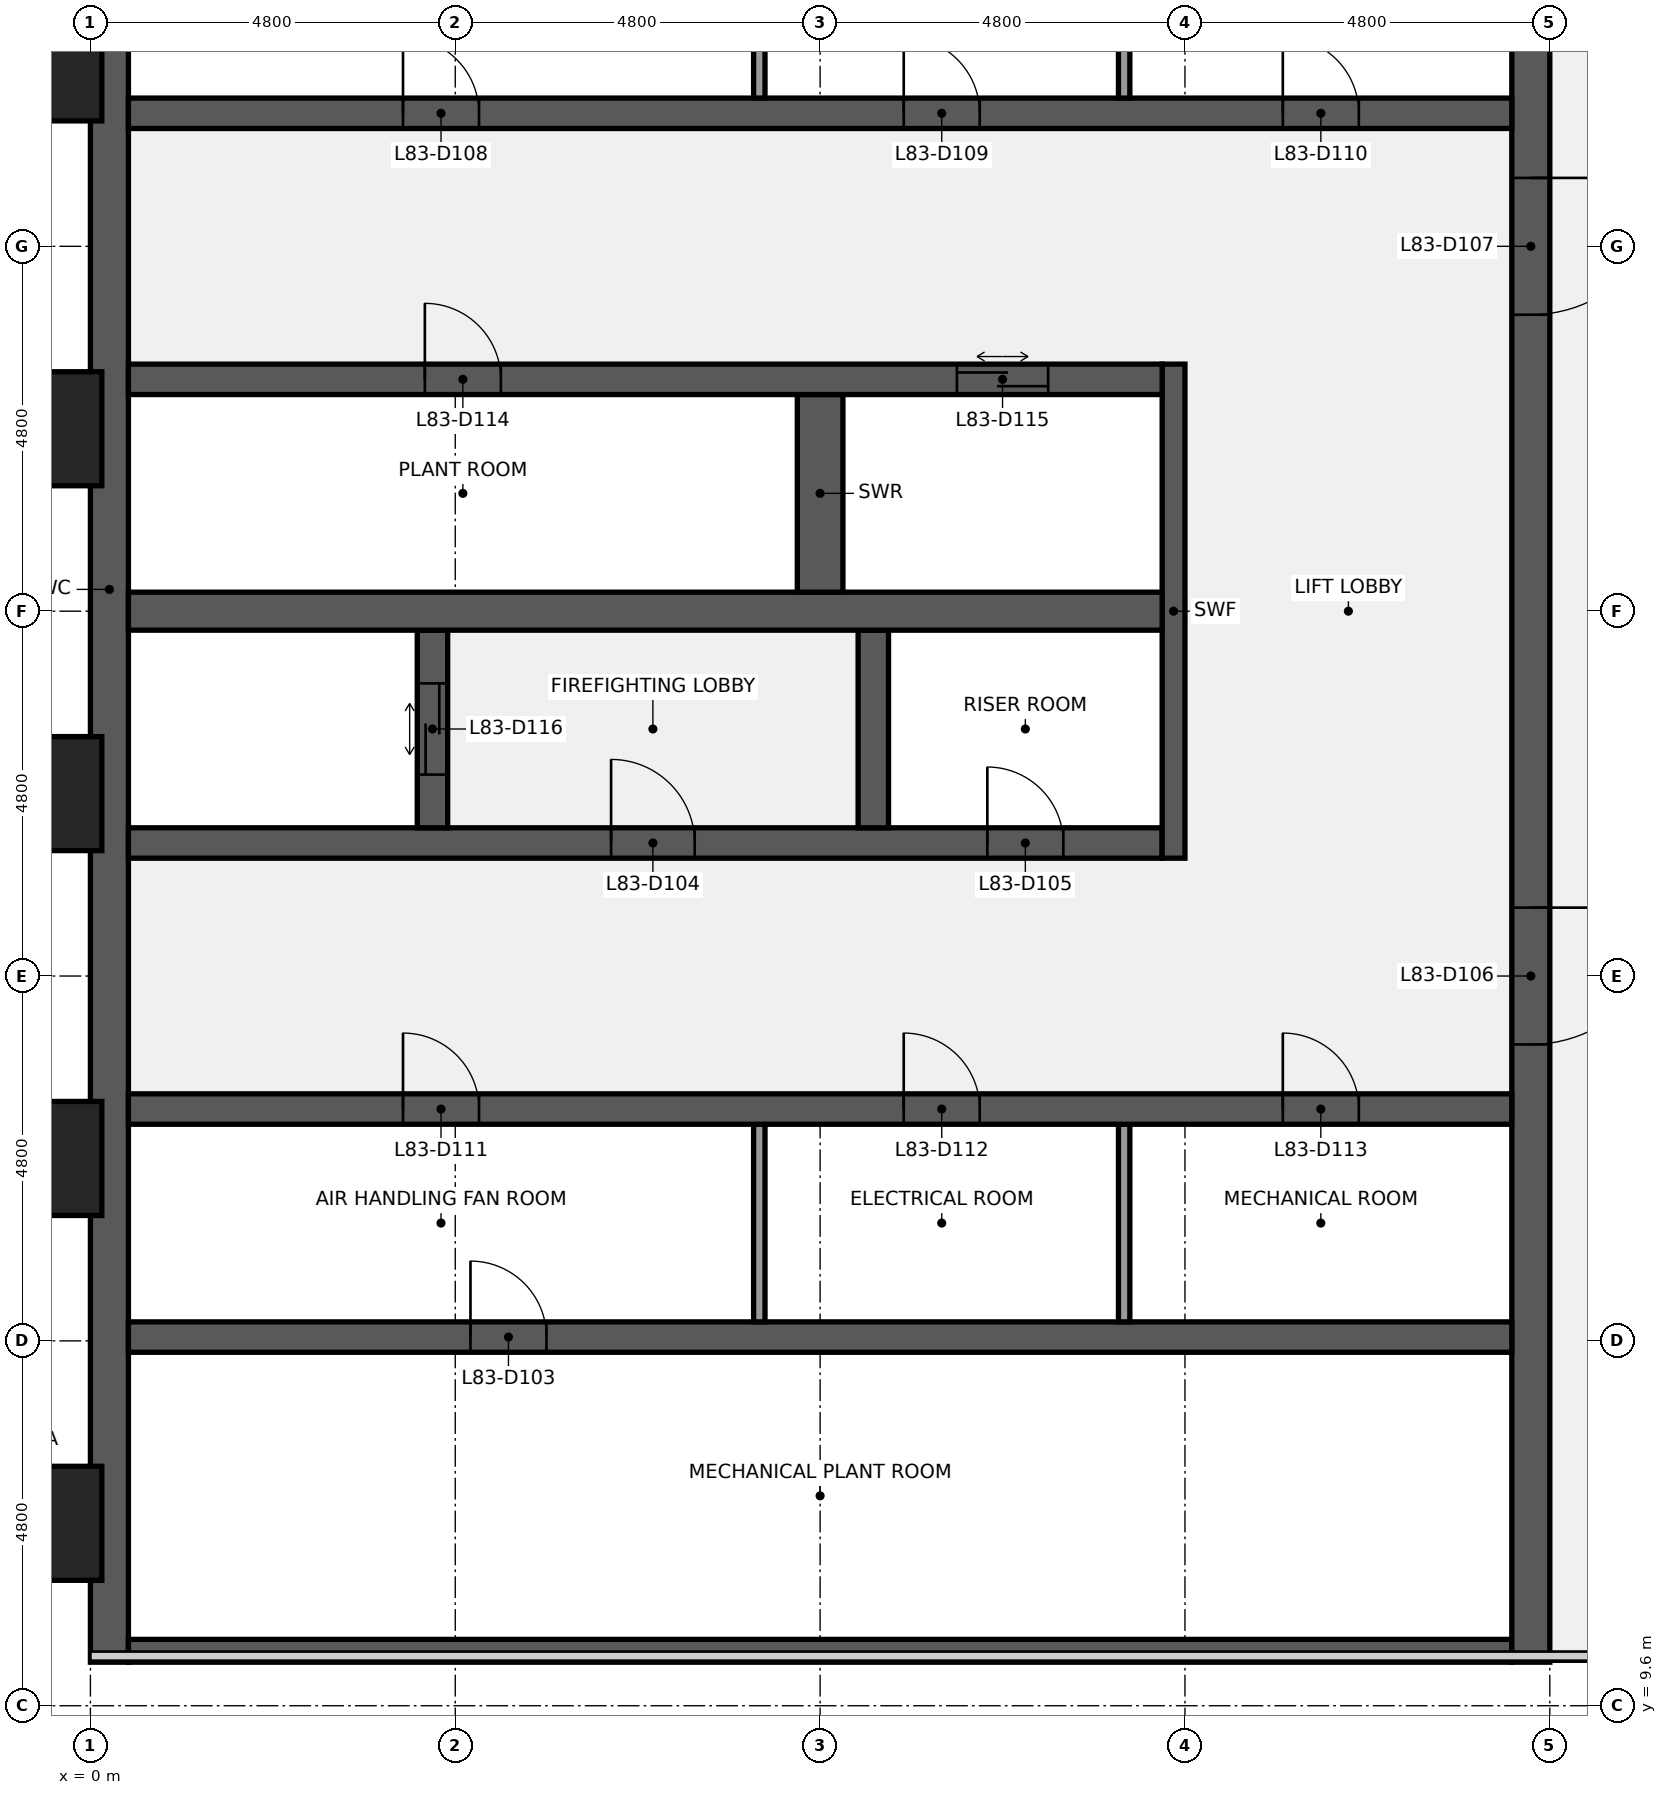
"""IFC4 building model, lengths in metres.
Left out: names, types, materials, properties, quantities, classifications, styles, units other than length and angle.
Written with IfcOpenShell. Run it as: python <this file> out.ifc"""

import sys

from ifc_helpers import new_model, si_unit, direction, frame, frame_2d, origin, origin_2d, place, context, subcontext, project, spatial, polyline, rectangle, outline, extrude, element, fill, save


model = new_model("IFC4")
c1 = context("Model", 3, precision=1e-05, world=origin(), true_north=direction((0.0, 1.0)))
c2 = subcontext(c1, "Body", "Model", "MODEL_VIEW")
j1 = project(units=[si_unit("LENGTHUNIT", "METRE"), si_unit("PLANEANGLEUNIT", "RADIAN")], contexts=[c1])
p1 = place(None, origin())
s1 = spatial("IfcSite", under=j1, at=p1, CompositionType="ELEMENT")
p2 = place(p1, origin())
s2 = spatial("IfcBuilding", under=s1, at=p2, CompositionType="ELEMENT")
p3 = place(p2, frame((0.0, 0.0, 370.3)))
s3 = spatial("IfcBuildingStorey", under=s2, at=p3, CompositionType="ELEMENT", Elevation=370.3)
p4 = place(p3, frame((0.25, 10.173, 0.0), z_axis=(0.0, 0.0, 1.0), x_axis=(0.0, 1.0, 0.0)))
e1 = element("IfcWall", 1, at=p4, inside=s3, PredefinedType="SHEAR", context=c2, shape_type="SweptSolid", body=[
    extrude(outline(polyline([(0.0, 0.0), (28.227, 0.0), (28.227, 3.75), (1.247, 3.75), (0.0, 2.488), (0.0, 0.0)])), frame((0.0, 0.25, 0.0), z_axis=(0.0, -1.0, 0.0), x_axis=(1.0, 0.0, 0.0)), (0.0, 0.0, 1.0), 0.5),
])
p5 = place(p3, frame((18.7, 10.323, 0.0), z_axis=(0.0, 0.0, 1.0), x_axis=(-1.0, 0.0, 0.0)))
e2 = element("IfcWall", 2, at=p5, inside=s3, PredefinedType="SHEAR", context=c2, shape_type="SweptSolid", body=[
    extrude(outline(polyline([(0.0, 0.0), (18.2, 0.0), (18.2, 2.639), (0.0, 2.639), (0.0, 0.0)])), frame((0.0, 0.15, 0.0), z_axis=(0.0, -1.0, 0.0), x_axis=(1.0, 0.0, 0.0)), (0.0, 0.0, 1.0), 0.3),
])
p6 = place(p3, frame((18.95, 38.4, 0.0), z_axis=(0.0, 0.0, 1.0), x_axis=(0.0, -1.0, 0.0)))
e3 = element("IfcWall", 3, at=p6, inside=s3, PredefinedType="SHEAR", context=c2, shape_type="SweptSolid", body=[
    extrude(outline(polyline([(0.0, 0.0), (28.227, 0.0), (28.227, 2.488), (26.98, 3.75), (0.0, 3.75), (0.0, 0.0)])), frame((0.0, 0.25, 0.0), z_axis=(0.0, -1.0, 0.0), x_axis=(1.0, 0.0, 0.0)), (0.0, 0.0, 1.0), 0.5),
])
p7 = place(p6, frame((18.3, 0.0, 0.0)))
e4 = element("IfcOpeningElement", 4, at=p7, cuts=e3, PredefinedType="OPENING", context=c2, shape_type="SweptSolid", body=[
    extrude(rectangle(XDim=1.8, YDim=2.1, at=frame_2d((0.9, 1.05))), frame((0.0, 0.26, 0.0), z_axis=(0.0, -1.0, 0.0), x_axis=(1.0, 0.0, 0.0)), (0.0, 0.0, 1.0), 0.52),
])
p8 = place(p6, frame((8.7, 0.0, 0.0)))
e5 = element("IfcOpeningElement", 5, at=p8, cuts=e3, PredefinedType="OPENING", context=c2, shape_type="SweptSolid", body=[
    extrude(rectangle(XDim=1.8, YDim=2.1, at=frame_2d((0.9, 1.05))), frame((0.0, 0.26, 0.0), z_axis=(0.0, -1.0, 0.0), x_axis=(1.0, 0.0, 0.0)), (0.0, 0.0, 1.0), 0.52),
])
p9 = place(p3, frame((0.5, 14.45, 0.0), z_axis=(0.0, 0.0, 1.0), x_axis=(1.0, 0.0, 0.0)))
e6 = element("IfcWall", 6, at=p9, inside=s3, PredefinedType="SHEAR", context=c2, shape_type="SweptSolid", body=[
    extrude(rectangle(XDim=18.2, YDim=0.4, at=frame_2d((9.1, 0.0))), origin(), (0.0, 0.0, 1.0), 3.75),
])
p10 = place(p9, frame((4.5, 0.0, 0.0)))
e7 = element("IfcOpeningElement", 7, at=p10, cuts=e6, PredefinedType="OPENING", context=c2, shape_type="SweptSolid", body=[
    extrude(rectangle(XDim=1.0, YDim=2.1, at=frame_2d((0.5, 1.05))), frame((0.0, 0.21, 0.0), z_axis=(0.0, -1.0, 0.0), x_axis=(1.0, 0.0, 0.0)), (0.0, 0.0, 1.0), 0.42),
])
for number, where, z_axis, x_axis in (
    (8, (8.8, 14.65, 0.0), (0.0, 0.0, 1.0), (0.0, 1.0, 0.0)),
    (9, (13.6, 14.65, 0.0), (0.0, 0.0, 1.0), (0.0, 1.0, 0.0)),
):
    element("IfcWall", number, at=place(p3, frame(where, z_axis=z_axis, x_axis=x_axis)), inside=s3, PredefinedType="PARTITIONING", context=c2, shape_type="SweptSolid", body=[
        extrude(rectangle(XDim=2.6, YDim=0.15, at=frame_2d((1.3, 0.0))), origin(), (0.0, 0.0, 1.0), 3.75),
    ])
p11 = place(p3, frame((0.5, 17.45, 0.0), z_axis=(0.0, 0.0, 1.0), x_axis=(1.0, 0.0, 0.0)))
e10 = element("IfcWall", 10, at=p11, inside=s3, PredefinedType="SHEAR", context=c2, shape_type="SweptSolid", body=[
    extrude(rectangle(XDim=18.2, YDim=0.4, at=frame_2d((9.1, 0.0))), origin(), (0.0, 0.0, 1.0), 3.75),
])
p12 = place(p11, frame((3.613, 0.0, 0.0)))
e11 = element("IfcOpeningElement", 11, at=p12, cuts=e10, PredefinedType="OPENING", context=c2, shape_type="SweptSolid", body=[
    extrude(rectangle(XDim=1.0, YDim=2.1, at=frame_2d((0.5, 1.05))), frame((0.0, 0.21, 0.0), z_axis=(0.0, -1.0, 0.0), x_axis=(1.0, 0.0, 0.0)), (0.0, 0.0, 1.0), 0.42),
])
p13 = place(p11, frame((10.2, 0.0, 0.0)))
e12 = element("IfcOpeningElement", 12, at=p13, cuts=e10, PredefinedType="OPENING", context=c2, shape_type="SweptSolid", body=[
    extrude(rectangle(XDim=1.0, YDim=2.1, at=frame_2d((0.5, 1.05))), frame((0.0, 0.21, 0.0), z_axis=(0.0, -1.0, 0.0), x_axis=(1.0, 0.0, 0.0)), (0.0, 0.0, 1.0), 0.42),
])
p14 = place(p11, frame((15.188, 0.0, 0.0)))
e13 = element("IfcOpeningElement", 13, at=p14, cuts=e10, PredefinedType="OPENING", context=c2, shape_type="SweptSolid", body=[
    extrude(rectangle(XDim=1.0, YDim=2.1, at=frame_2d((0.5, 1.05))), frame((0.0, 0.21, 0.0), z_axis=(0.0, -1.0, 0.0), x_axis=(1.0, 0.0, 0.0)), (0.0, 0.0, 1.0), 0.42),
])
p15 = place(p3, frame((0.5, 20.95, 0.0), z_axis=(0.0, 0.0, 1.0), x_axis=(1.0, 0.0, 0.0)))
e14 = element("IfcWall", 14, at=p15, inside=s3, PredefinedType="SHEAR", context=c2, shape_type="SweptSolid", body=[
    extrude(rectangle(XDim=13.6, YDim=0.4, at=frame_2d((6.8, 0.0))), origin(), (0.0, 0.0, 1.0), 3.75),
])
p16 = place(p15, frame((6.35, 0.0, 0.0)))
e15 = element("IfcOpeningElement", 15, at=p16, cuts=e14, PredefinedType="OPENING", context=c2, shape_type="SweptSolid", body=[
    extrude(rectangle(XDim=1.1, YDim=2.1, at=frame_2d((0.55, 1.05))), frame((0.0, 0.21, 0.0), z_axis=(0.0, -1.0, 0.0), x_axis=(1.0, 0.0, 0.0)), (0.0, 0.0, 1.0), 0.42),
])
p17 = place(p15, frame((11.3, 0.0, 0.0)))
e16 = element("IfcOpeningElement", 16, at=p17, cuts=e14, PredefinedType="OPENING", context=c2, shape_type="SweptSolid", body=[
    extrude(rectangle(XDim=1.0, YDim=2.1, at=frame_2d((0.5, 1.05))), frame((0.0, 0.21, 0.0), z_axis=(0.0, -1.0, 0.0), x_axis=(1.0, 0.0, 0.0)), (0.0, 0.0, 1.0), 0.42),
])
p18 = place(p3, frame((14.25, 20.75, 0.0), z_axis=(0.0, 0.0, 1.0), x_axis=(0.0, 1.0, 0.0)))
e17 = element("IfcWall", 17, at=p18, inside=s3, PredefinedType="SHEAR", context=c2, shape_type="SweptSolid", body=[
    extrude(rectangle(XDim=6.5, YDim=0.3, at=frame_2d((3.25, 0.0))), origin(), (0.0, 0.0, 1.0), 3.75),
])
p19 = place(p3, frame((4.5, 21.15, 0.0), z_axis=(0.0, 0.0, 1.0), x_axis=(0.0, 1.0, 0.0)))
e18 = element("IfcWall", 18, at=p19, inside=s3, PredefinedType="SHEAR", context=c2, shape_type="SweptSolid", body=[
    extrude(rectangle(XDim=2.6, YDim=0.4, at=frame_2d((1.3, 0.0))), origin(), (0.0, 0.0, 1.0), 3.75),
])
p20 = place(p19, frame((0.7, 0.0, 0.0)))
e19 = element("IfcOpeningElement", 19, at=p20, cuts=e18, PredefinedType="OPENING", context=c2, shape_type="SweptSolid", body=[
    extrude(rectangle(XDim=1.2, YDim=2.1, at=frame_2d((0.6, 1.05))), frame((0.0, 0.21, 0.0), z_axis=(0.0, -1.0, 0.0), x_axis=(1.0, 0.0, 0.0)), (0.0, 0.0, 1.0), 0.42),
])
p21 = place(p3, frame((10.3, 21.15, 0.0), z_axis=(0.0, 0.0, 1.0), x_axis=(0.0, 1.0, 0.0)))
e20 = element("IfcWall", 20, at=p21, inside=s3, PredefinedType="SHEAR", context=c2, shape_type="SweptSolid", body=[
    extrude(rectangle(XDim=2.6, YDim=0.4, at=frame_2d((1.3, 0.0))), origin(), (0.0, 0.0, 1.0), 3.75),
])
p22 = place(p3, frame((0.5, 24.0, 0.0), z_axis=(0.0, 0.0, 1.0), x_axis=(1.0, 0.0, 0.0)))
e21 = element("IfcWall", 21, at=p22, inside=s3, PredefinedType="SHEAR", context=c2, shape_type="SweptSolid", body=[
    extrude(rectangle(XDim=13.6, YDim=0.5, at=frame_2d((6.8, 0.0))), origin(), (0.0, 0.0, 1.0), 3.75),
])
p23 = place(p3, frame((9.6, 24.25, 0.0), z_axis=(0.0, 0.0, 1.0), x_axis=(0.0, 1.0, 0.0)))
e22 = element("IfcWall", 22, at=p23, inside=s3, PredefinedType="SHEAR", context=c2, shape_type="SweptSolid", body=[
    extrude(rectangle(XDim=2.6, YDim=0.6, at=frame_2d((1.3, 0.0))), origin(), (0.0, 0.0, 1.0), 3.75),
])
p24 = place(p3, frame((0.5, 27.05, 0.0), z_axis=(0.0, 0.0, 1.0), x_axis=(1.0, 0.0, 0.0)))
e23 = element("IfcWall", 23, at=p24, inside=s3, PredefinedType="SHEAR", context=c2, shape_type="SweptSolid", body=[
    extrude(rectangle(XDim=13.6, YDim=0.4, at=frame_2d((6.8, 0.0))), origin(), (0.0, 0.0, 1.0), 3.75),
])
p25 = place(p24, frame((3.9, 0.0, 0.0)))
e24 = element("IfcOpeningElement", 24, at=p25, cuts=e23, PredefinedType="OPENING", context=c2, shape_type="SweptSolid", body=[
    extrude(rectangle(XDim=1.0, YDim=2.1, at=frame_2d((0.5, 1.05))), frame((0.0, 0.21, 0.0), z_axis=(0.0, -1.0, 0.0), x_axis=(1.0, 0.0, 0.0)), (0.0, 0.0, 1.0), 0.42),
])
p26 = place(p24, frame((10.9, 0.0, 0.0)))
e25 = element("IfcOpeningElement", 25, at=p26, cuts=e23, PredefinedType="OPENING", context=c2, shape_type="SweptSolid", body=[
    extrude(rectangle(XDim=1.2, YDim=2.1, at=frame_2d((0.6, 1.05))), frame((0.0, 0.21, 0.0), z_axis=(0.0, -1.0, 0.0), x_axis=(1.0, 0.0, 0.0)), (0.0, 0.0, 1.0), 0.42),
])
p27 = place(p3, frame((0.5, 30.55, 0.0), z_axis=(0.0, 0.0, 1.0), x_axis=(1.0, 0.0, 0.0)))
e26 = element("IfcWall", 26, at=p27, inside=s3, PredefinedType="SHEAR", context=c2, shape_type="SweptSolid", body=[
    extrude(rectangle(XDim=18.2, YDim=0.4, at=frame_2d((9.1, 0.0))), origin(), (0.0, 0.0, 1.0), 3.75),
])
p28 = place(p27, frame((3.613, 0.0, 0.0)))
e27 = element("IfcOpeningElement", 27, at=p28, cuts=e26, PredefinedType="OPENING", context=c2, shape_type="SweptSolid", body=[
    extrude(rectangle(XDim=1.0, YDim=2.1, at=frame_2d((0.5, 1.05))), frame((0.0, 0.21, 0.0), z_axis=(0.0, -1.0, 0.0), x_axis=(1.0, 0.0, 0.0)), (0.0, 0.0, 1.0), 0.42),
])
p29 = place(p27, frame((10.2, 0.0, 0.0)))
e28 = element("IfcOpeningElement", 28, at=p29, cuts=e26, PredefinedType="OPENING", context=c2, shape_type="SweptSolid", body=[
    extrude(rectangle(XDim=1.0, YDim=2.1, at=frame_2d((0.5, 1.05))), frame((0.0, 0.21, 0.0), z_axis=(0.0, -1.0, 0.0), x_axis=(1.0, 0.0, 0.0)), (0.0, 0.0, 1.0), 0.42),
])
p30 = place(p27, frame((15.188, 0.0, 0.0)))
e29 = element("IfcOpeningElement", 29, at=p30, cuts=e26, PredefinedType="OPENING", context=c2, shape_type="SweptSolid", body=[
    extrude(rectangle(XDim=1.0, YDim=2.1, at=frame_2d((0.5, 1.05))), frame((0.0, 0.21, 0.0), z_axis=(0.0, -1.0, 0.0), x_axis=(1.0, 0.0, 0.0)), (0.0, 0.0, 1.0), 0.42),
])
for number, where, z_axis, x_axis in (
    (30, (8.8, 30.75, 0.0), (0.0, 0.0, 1.0), (0.0, 1.0, 0.0)),
    (31, (13.6, 30.75, 0.0), (0.0, 0.0, 1.0), (0.0, 1.0, 0.0)),
):
    element("IfcWall", number, at=place(p3, frame(where, z_axis=z_axis, x_axis=x_axis)), inside=s3, PredefinedType="PARTITIONING", context=c2, shape_type="SweptSolid", body=[
        extrude(rectangle(XDim=2.6, YDim=0.15, at=frame_2d((1.3, 0.0))), origin(), (0.0, 0.0, 1.0), 3.75),
    ])
p31 = place(p3, frame((-0.75, 12.0, 0.0), z_axis=(0.0, 0.0, 1.0), x_axis=(0.0, 1.0, 0.0)))
e32 = element("IfcColumn", 32, at=p31, inside=s3, PredefinedType="PILASTER", context=c2, shape_type="SweptSolid", body=[
    extrude(rectangle(XDim=1.8, YDim=1.5, at=origin_2d()), origin(), (0.0, 0.0, 1.0), 3.387),
])
for number, where, z_axis, x_axis in (
    (33, (-0.75, 16.8, 0.0), (0.0, 0.0, 1.0), (0.0, 1.0, 0.0)),
    (34, (-0.75, 21.6, 0.0), (0.0, 0.0, 1.0), (0.0, 1.0, 0.0)),
    (35, (-0.75, 26.4, 0.0), (0.0, 0.0, 1.0), (0.0, 1.0, 0.0)),
    (36, (-0.75, 31.2, 0.0), (0.0, 0.0, 1.0), (0.0, 1.0, 0.0)),
):
    element("IfcColumn", number, at=place(p3, frame(where, z_axis=z_axis, x_axis=x_axis)), inside=s3, PredefinedType="PILASTER", context=c2, shape_type="SweptSolid", body=[
        extrude(rectangle(XDim=1.8, YDim=1.5, at=origin_2d()), origin(), (0.0, 0.0, 1.0), 4.0),
    ])
p32 = place(p10, origin())
e37 = element("IfcDoor", 37, at=p32, inside=s3, OperationType="SINGLE_SWING_LEFT", PredefinedType="DOOR", context=c2, shape_type="SweptSolid", body=[
    extrude(rectangle(XDim=1.0, YDim=2.1, at=frame_2d((0.5, 1.05))), frame((0.0, 0.025, 0.0), z_axis=(0.0, -1.0, 0.0), x_axis=(1.0, 0.0, 0.0)), (0.0, 0.0, 1.0), 0.05),
])
fill(e7, e37)
p33 = place(p16, origin())
e38 = element("IfcDoor", 38, at=p33, inside=s3, OperationType="SINGLE_SWING_LEFT", PredefinedType="DOOR", context=c2, shape_type="SweptSolid", body=[
    extrude(rectangle(XDim=1.1, YDim=2.1, at=frame_2d((0.55, 1.05))), frame((0.0, 0.025, 0.0), z_axis=(0.0, -1.0, 0.0), x_axis=(1.0, 0.0, 0.0)), (0.0, 0.0, 1.0), 0.05),
])
fill(e15, e38)
p34 = place(p17, origin())
e39 = element("IfcDoor", 39, at=p34, inside=s3, OperationType="SINGLE_SWING_LEFT", PredefinedType="DOOR", context=c2, shape_type="SweptSolid", body=[
    extrude(rectangle(XDim=1.0, YDim=2.1, at=frame_2d((0.5, 1.05))), frame((0.0, 0.025, 0.0), z_axis=(0.0, -1.0, 0.0), x_axis=(1.0, 0.0, 0.0)), (0.0, 0.0, 1.0), 0.05),
])
fill(e16, e39)
p35 = place(p7, origin())
e40 = element("IfcDoor", 40, at=p35, inside=s3, OperationType="DOUBLE_DOOR_SINGLE_SWING", PredefinedType="DOOR", context=c2, shape_type="SweptSolid", body=[
    extrude(rectangle(XDim=1.8, YDim=2.1, at=frame_2d((0.9, 1.05))), frame((0.0, 0.025, 0.0), z_axis=(0.0, -1.0, 0.0), x_axis=(1.0, 0.0, 0.0)), (0.0, 0.0, 1.0), 0.05),
])
fill(e4, e40)
p36 = place(p8, origin())
e41 = element("IfcDoor", 41, at=p36, inside=s3, OperationType="DOUBLE_DOOR_SINGLE_SWING", PredefinedType="DOOR", context=c2, shape_type="SweptSolid", body=[
    extrude(rectangle(XDim=1.8, YDim=2.1, at=frame_2d((0.9, 1.05))), frame((0.0, 0.025, 0.0), z_axis=(0.0, -1.0, 0.0), x_axis=(1.0, 0.0, 0.0)), (0.0, 0.0, 1.0), 0.05),
])
fill(e5, e41)
p37 = place(p28, origin())
e42 = element("IfcDoor", 42, at=p37, inside=s3, OperationType="SINGLE_SWING_LEFT", PredefinedType="DOOR", context=c2, shape_type="SweptSolid", body=[
    extrude(rectangle(XDim=1.0, YDim=2.1, at=frame_2d((0.5, 1.05))), frame((0.0, 0.025, 0.0), z_axis=(0.0, -1.0, 0.0), x_axis=(1.0, 0.0, 0.0)), (0.0, 0.0, 1.0), 0.05),
])
fill(e27, e42)
p38 = place(p29, origin())
e43 = element("IfcDoor", 43, at=p38, inside=s3, OperationType="SINGLE_SWING_LEFT", PredefinedType="DOOR", context=c2, shape_type="SweptSolid", body=[
    extrude(rectangle(XDim=1.0, YDim=2.1, at=frame_2d((0.5, 1.05))), frame((0.0, 0.025, 0.0), z_axis=(0.0, -1.0, 0.0), x_axis=(1.0, 0.0, 0.0)), (0.0, 0.0, 1.0), 0.05),
])
fill(e28, e43)
p39 = place(p30, origin())
e44 = element("IfcDoor", 44, at=p39, inside=s3, OperationType="SINGLE_SWING_LEFT", PredefinedType="DOOR", context=c2, shape_type="SweptSolid", body=[
    extrude(rectangle(XDim=1.0, YDim=2.1, at=frame_2d((0.5, 1.05))), frame((0.0, 0.025, 0.0), z_axis=(0.0, -1.0, 0.0), x_axis=(1.0, 0.0, 0.0)), (0.0, 0.0, 1.0), 0.05),
])
fill(e29, e44)
p40 = place(p12, origin())
e45 = element("IfcDoor", 45, at=p40, inside=s3, OperationType="SINGLE_SWING_LEFT", PredefinedType="DOOR", context=c2, shape_type="SweptSolid", body=[
    extrude(rectangle(XDim=1.0, YDim=2.1, at=frame_2d((0.5, 1.05))), frame((0.0, 0.025, 0.0), z_axis=(0.0, -1.0, 0.0), x_axis=(1.0, 0.0, 0.0)), (0.0, 0.0, 1.0), 0.05),
])
fill(e11, e45)
p41 = place(p13, origin())
e46 = element("IfcDoor", 46, at=p41, inside=s3, OperationType="SINGLE_SWING_LEFT", PredefinedType="DOOR", context=c2, shape_type="SweptSolid", body=[
    extrude(rectangle(XDim=1.0, YDim=2.1, at=frame_2d((0.5, 1.05))), frame((0.0, 0.025, 0.0), z_axis=(0.0, -1.0, 0.0), x_axis=(1.0, 0.0, 0.0)), (0.0, 0.0, 1.0), 0.05),
])
fill(e12, e46)
p42 = place(p14, origin())
e47 = element("IfcDoor", 47, at=p42, inside=s3, OperationType="SINGLE_SWING_LEFT", PredefinedType="DOOR", context=c2, shape_type="SweptSolid", body=[
    extrude(rectangle(XDim=1.0, YDim=2.1, at=frame_2d((0.5, 1.05))), frame((0.0, 0.025, 0.0), z_axis=(0.0, -1.0, 0.0), x_axis=(1.0, 0.0, 0.0)), (0.0, 0.0, 1.0), 0.05),
])
fill(e13, e47)
p43 = place(p25, origin())
e48 = element("IfcDoor", 48, at=p43, inside=s3, OperationType="SINGLE_SWING_LEFT", PredefinedType="DOOR", context=c2, shape_type="SweptSolid", body=[
    extrude(rectangle(XDim=1.0, YDim=2.1, at=frame_2d((0.5, 1.05))), frame((0.0, 0.025, 0.0), z_axis=(0.0, -1.0, 0.0), x_axis=(1.0, 0.0, 0.0)), (0.0, 0.0, 1.0), 0.05),
])
fill(e24, e48)
p44 = place(p26, origin())
e49 = element("IfcDoor", 49, at=p44, inside=s3, OperationType="DOUBLE_DOOR_SLIDING", PredefinedType="DOOR", context=c2, shape_type="SweptSolid", body=[
    extrude(rectangle(XDim=1.2, YDim=2.1, at=frame_2d((0.6, 1.05))), frame((0.0, 0.025, 0.0), z_axis=(0.0, -1.0, 0.0), x_axis=(1.0, 0.0, 0.0)), (0.0, 0.0, 1.0), 0.05),
])
fill(e25, e49)
p45 = place(p20, origin())
e50 = element("IfcDoor", 50, at=p45, inside=s3, OperationType="DOUBLE_DOOR_SLIDING", PredefinedType="DOOR", context=c2, shape_type="SweptSolid", body=[
    extrude(rectangle(XDim=1.2, YDim=2.1, at=frame_2d((0.6, 1.05))), frame((0.0, 0.025, 0.0), z_axis=(0.0, -1.0, 0.0), x_axis=(1.0, 0.0, 0.0)), (0.0, 0.0, 1.0), 0.05),
])
fill(e19, e50)
save(model, sys.argv[1])
